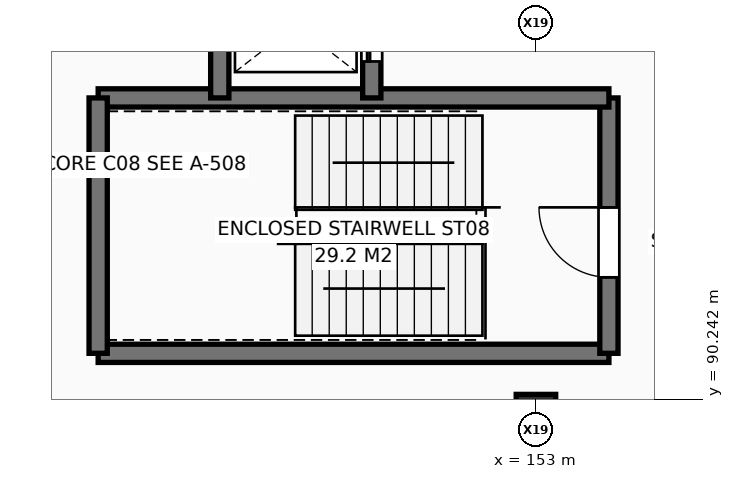
"""IFC4 building model, lengths in metres.
Left out: names, types, materials, properties, quantities, classifications, styles, units other than length and angle.
Written with IfcOpenShell. Run it as: python <this file> out.ifc"""

import sys

from ifc_helpers import new_model, si_unit, direction, frame, frame_2d, origin, origin_2d, place, context, subcontext, project, spatial, rectangle, extrude, element, fill, save


model = new_model("IFC4")
c1 = context("Model", 3, precision=1e-05, world=origin(), true_north=direction((0.0, 1.0)))
c2 = subcontext(c1, "Body", "Model", "MODEL_VIEW")
j1 = project(units=[si_unit("LENGTHUNIT", "METRE"), si_unit("PLANEANGLEUNIT", "RADIAN")], contexts=[c1])
p1 = place(None, origin())
s1 = spatial("IfcSite", under=j1, at=p1, CompositionType="ELEMENT")
p2 = place(p1, origin())
s2 = spatial("IfcBuilding", under=s1, at=p2, CompositionType="ELEMENT")
p3 = place(p2, frame((0.0, 0.0, 9.6)))
s3 = spatial("IfcBuildingStorey", under=s2, at=p3, CompositionType="ELEMENT", Elevation=9.6)
p4 = place(p3, frame((153.0, 90.0, 0.0), z_axis=(0.0, 0.0, 1.0), x_axis=(1.0, 0.0, 0.0)))
e1 = element("IfcColumn", 1, at=p4, inside=s3, PredefinedType="COLUMN", context=c2, shape_type="SweptSolid", body=[
    extrude(rectangle(XDim=0.65, YDim=0.65, at=origin_2d()), origin(), (0.0, 0.0, 1.0), 4.2),
])
p5 = place(p3, frame((145.8, 91.0, 0.0), z_axis=(0.0, 0.0, 1.0), x_axis=(1.0, 0.0, 0.0)))
e2 = element("IfcWall", 2, at=p5, inside=s3, PredefinedType="SHEAR", context=c2, shape_type="SweptSolid", body=[
    extrude(rectangle(XDim=8.4, YDim=0.3, at=frame_2d((4.2, 0.0))), origin(), (0.0, 0.0, 1.0), 3.92),
])
p6 = place(p3, frame((154.2, 91.0, 0.0), z_axis=(0.0, 0.0, 1.0), x_axis=(0.0, 1.0, 0.0)))
e3 = element("IfcWall", 3, at=p6, inside=s3, PredefinedType="SHEAR", context=c2, shape_type="SweptSolid", body=[
    extrude(rectangle(XDim=4.2, YDim=0.3, at=frame_2d((2.1, 0.0))), origin(), (0.0, 0.0, 1.0), 3.92),
])
p7 = place(p6, frame((1.25, 0.0, 0.0)))
e4 = element("IfcOpeningElement", 4, at=p7, cuts=e3, PredefinedType="OPENING", context=c2, shape_type="SweptSolid", body=[
    extrude(rectangle(XDim=1.15, YDim=2.2, at=frame_2d((0.575, 1.1))), frame((0.0, 0.16, 0.0), z_axis=(0.0, -1.0, 0.0), x_axis=(1.0, 0.0, 0.0)), (0.0, 0.0, 1.0), 0.32),
])
p8 = place(p3, frame((154.2, 95.2, 0.0), z_axis=(0.0, 0.0, 1.0), x_axis=(-1.0, 0.0, 0.0)))
e5 = element("IfcWall", 5, at=p8, inside=s3, PredefinedType="SHEAR", context=c2, shape_type="SweptSolid", body=[
    extrude(rectangle(XDim=8.4, YDim=0.3, at=frame_2d((4.2, 0.0))), origin(), (0.0, 0.0, 1.0), 3.92),
])
p9 = place(p3, frame((145.8, 95.2, 0.0), z_axis=(0.0, 0.0, 1.0), x_axis=(0.0, -1.0, 0.0)))
e6 = element("IfcWall", 6, at=p9, inside=s3, PredefinedType="SHEAR", context=c2, shape_type="SweptSolid", body=[
    extrude(rectangle(XDim=4.2, YDim=0.3, at=frame_2d((2.1, 0.0))), origin(), (0.0, 0.0, 1.0), 3.92),
])
p10 = place(p3, frame((147.8, 97.6, 0.0), z_axis=(0.0, 0.0, 1.0), x_axis=(0.0, -1.0, 0.0)))
e7 = element("IfcWall", 7, at=p10, inside=s3, PredefinedType="SHEAR", context=c2, shape_type="SweptSolid", body=[
    extrude(rectangle(XDim=2.4, YDim=0.3, at=frame_2d((1.2, 0.0))), origin(), (0.0, 0.0, 1.0), 3.92),
])
p11 = place(p3, frame((150.3, 95.2, 0.0), z_axis=(0.0, 0.0, 1.0), x_axis=(0.0, 1.0, 0.0)))
e8 = element("IfcWall", 8, at=p11, inside=s3, PredefinedType="SHEAR", context=c2, shape_type="SweptSolid", body=[
    extrude(rectangle(XDim=2.4, YDim=0.3, at=frame_2d((1.2, 0.0))), origin(), (0.0, 0.0, 1.0), 3.92),
])
p12 = place(p11, frame((0.6, 0.0, 0.0)))
e9 = element("IfcOpeningElement", 9, at=p12, cuts=e8, PredefinedType="OPENING", context=c2, shape_type="SweptSolid", body=[
    extrude(rectangle(XDim=1.2, YDim=2.25, at=frame_2d((0.6, 1.125))), frame((0.0, 0.16, 0.0), z_axis=(0.0, -1.0, 0.0), x_axis=(1.0, 0.0, 0.0)), (0.0, 0.0, 1.0), 0.32),
])
p13 = place(p7, origin())
e10 = element("IfcDoor", 10, at=p13, inside=s3, OperationType="SINGLE_SWING_RIGHT", PredefinedType="DOOR", context=c2, shape_type="SweptSolid", body=[
    extrude(rectangle(XDim=1.15, YDim=2.2, at=frame_2d((0.575, 1.1))), frame((0.0, 0.025, 0.0), z_axis=(0.0, -1.0, 0.0), x_axis=(1.0, 0.0, 0.0)), (0.0, 0.0, 1.0), 0.05),
])
fill(e4, e10)
p14 = place(p12, origin())
e11 = element("IfcDoor", 11, at=p14, inside=s3, OperationType="SLIDING_TO_LEFT", PredefinedType="DOOR", context=c2, shape_type="SweptSolid", body=[
    extrude(rectangle(XDim=1.2, YDim=2.25, at=frame_2d((0.6, 1.125))), frame((0.0, 0.025, 0.0), z_axis=(0.0, -1.0, 0.0), x_axis=(1.0, 0.0, 0.0)), (0.0, 0.0, 1.0), 0.05),
])
fill(e9, e11)
save(model, sys.argv[1])
